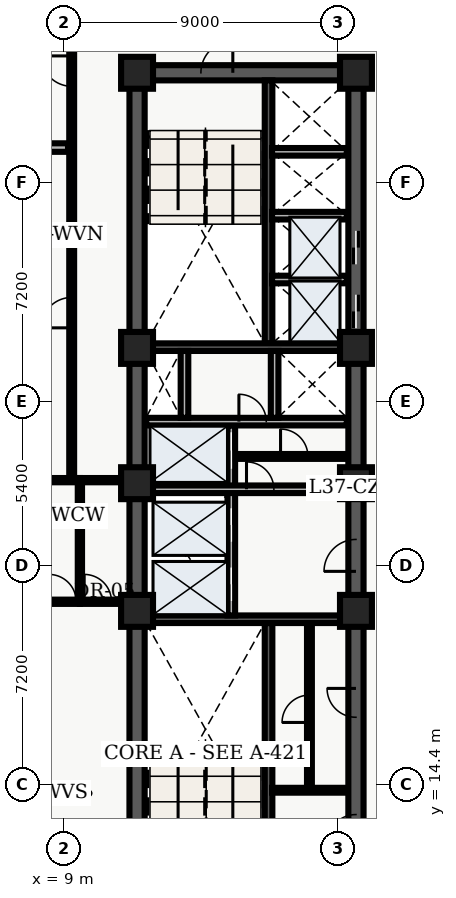
"""IFC4 building model, lengths in metres.
Left out: names, types, materials, properties, quantities, classifications, styles, units other than length and angle.
Written with IfcOpenShell. Run it as: python <this file> out.ifc"""

import sys

from ifc_helpers import new_model, entity, si_unit, converted_unit, direction, frame, origin_with_axes, origin_2d_with_axis, place, context, subcontext, project, spatial, polyline, rectangle, outline, extrude, element, fill, save


model = new_model("IFC4")
c1 = context("Model", 3, precision=1e-05, world=origin_with_axes(), true_north=direction((0.0, 1.0)))
c2 = subcontext(c1, "Body", "Model", "MODEL_VIEW")
j1 = project(units=[si_unit("LENGTHUNIT", "METRE"), converted_unit("PLANEANGLEUNIT", "DEGREE", entity("IfcPlaneAngleMeasure", 0.017), si_unit("PLANEANGLEUNIT", "RADIAN"), dimensions=[0, 0, 0, 0, 0, 0, 0])], contexts=[c1])
p1 = place(None, origin_with_axes())
s1 = spatial("IfcSite", under=j1, at=p1, CompositionType="ELEMENT")
p2 = place(p1, origin_with_axes())
s2 = spatial("IfcBuilding", under=s1, at=p2, CompositionType="ELEMENT")
p3 = place(p2, frame((0.0, 0.0, 152.4), z_axis=(0.0, 0.0, 1.0), x_axis=(1.0, 0.0, 0.0)))
s3 = spatial("IfcBuildingStorey", under=s2, at=p3, CompositionType="ELEMENT", Elevation=152.4)
p4 = place(p3, frame((11.4, 10.8, 0.0), z_axis=(0.0, 0.0, 1.0), x_axis=(0.0, 1.0, 0.0)))
e1 = element("IfcWall", 1, at=p4, inside=s3, PredefinedType="SHEAR", context=c2, shape_type="SweptSolid", body=[
    extrude(outline(polyline([(0.0, -0.25), (27.0, -0.25), (27.0, 0.25), (0.0, 0.25), (0.0, -0.25)])), origin_with_axes(), (0.0, 0.0, 1.0), 3.66),
])
p5 = place(p3, frame((11.4, 37.8, 0.0), z_axis=(0.0, 0.0, 1.0), x_axis=(1.0, 0.0, 0.0)))
e2 = element("IfcWall", 2, at=p5, inside=s3, PredefinedType="SHEAR", context=c2, shape_type="SweptSolid", body=[
    extrude(outline(polyline([(0.0, -0.25), (7.2, -0.25), (7.2, 0.25), (0.0, 0.25), (0.0, -0.25)])), origin_with_axes(), (0.0, 0.0, 1.0), 3.66),
])
p6 = place(p5, frame((2.625, 0.0, 0.0), z_axis=(0.0, 0.0, 1.0), x_axis=(1.0, 0.0, 0.0)))
e3 = element("IfcOpeningElement", 3, at=p6, cuts=e2, PredefinedType="OPENING", context=c2, shape_type="SweptSolid", body=[
    extrude(rectangle(XDim=1.05, YDim=0.52, at=origin_2d_with_axis()), origin_with_axes(), (0.0, 0.0, 1.0), 2.15),
])
p7 = place(p3, frame((18.6, 10.8, 0.0), z_axis=(0.0, 0.0, 1.0), x_axis=(0.0, 1.0, 0.0)))
e4 = element("IfcWall", 4, at=p7, inside=s3, PredefinedType="SHEAR", context=c2, shape_type="SweptSolid", body=[
    extrude(outline(polyline([(0.0, -0.25), (13.5, -0.25), (13.5, 0.25), (0.0, 0.25), (0.0, -0.25)])), origin_with_axes(), (0.0, 0.0, 1.0), 3.66),
])
p8 = place(p7, frame((11.125, 0.0, 0.0), z_axis=(0.0, 0.0, 1.0), x_axis=(1.0, 0.0, 0.0)))
e5 = element("IfcOpeningElement", 5, at=p8, cuts=e4, PredefinedType="OPENING", context=c2, shape_type="SweptSolid", body=[
    extrude(rectangle(XDim=1.05, YDim=0.52, at=origin_2d_with_axis()), origin_with_axes(), (0.0, 0.0, 1.0), 2.15),
])
p9 = place(p7, frame((2.125, 0.0, 0.0), z_axis=(0.0, 0.0, 1.0), x_axis=(1.0, 0.0, 0.0)))
e6 = element("IfcOpeningElement", 6, at=p9, cuts=e4, PredefinedType="OPENING", context=c2, shape_type="SweptSolid", body=[
    extrude(rectangle(XDim=0.95, YDim=0.52, at=origin_2d_with_axis()), origin_with_axes(), (0.0, 0.0, 1.0), 2.15),
])
p10 = place(p7, frame((6.275, 0.0, 0.0), z_axis=(0.0, 0.0, 1.0), x_axis=(1.0, 0.0, 0.0)))
e7 = element("IfcOpeningElement", 7, at=p10, cuts=e4, PredefinedType="OPENING", context=c2, shape_type="SweptSolid", body=[
    extrude(rectangle(XDim=0.95, YDim=0.52, at=origin_2d_with_axis()), origin_with_axes(), (0.0, 0.0, 1.0), 2.15),
])
p11 = place(p3, frame((18.6, 24.3, 0.0), z_axis=(0.0, 0.0, 1.0), x_axis=(0.0, 1.0, 0.0)))
e8 = element("IfcWall", 8, at=p11, inside=s3, PredefinedType="SHEAR", context=c2, shape_type="SweptSolid", body=[
    extrude(outline(polyline([(0.0, -0.25), (13.5, -0.25), (13.5, 0.25), (0.0, 0.25), (0.0, -0.25)])), origin_with_axes(), (0.0, 0.0, 1.0), 3.66),
])
p12 = place(p11, frame((5.65, 0.0, 0.0), z_axis=(0.0, 0.0, 1.0), x_axis=(1.0, 0.0, 0.0)))
e9 = element("IfcOpeningElement", 9, at=p12, cuts=e8, PredefinedType="OPENING", context=c2, shape_type="SweptSolid", body=[
    extrude(rectangle(XDim=1.1, YDim=0.52, at=origin_2d_with_axis()), origin_with_axes(), (0.0, 0.0, 1.0), 2.15),
])
p13 = place(p11, frame((7.75, 0.0, 0.0), z_axis=(0.0, 0.0, 1.0), x_axis=(1.0, 0.0, 0.0)))
e10 = element("IfcOpeningElement", 10, at=p13, cuts=e8, PredefinedType="OPENING", context=c2, shape_type="SweptSolid", body=[
    extrude(rectangle(XDim=1.1, YDim=0.52, at=origin_2d_with_axis()), origin_with_axes(), (0.0, 0.0, 1.0), 2.15),
])
p14 = place(p3, frame((15.725, 11.05, 0.0), z_axis=(0.0, 0.0, 1.0), x_axis=(0.0, 1.0, 0.0)))
e11 = element("IfcWall", 11, at=p14, inside=s3, PredefinedType="SHEAR", context=c2, shape_type="SweptSolid", body=[
    extrude(outline(polyline([(0.0, -0.125), (8.65, -0.125), (8.65, 0.125), (0.0, 0.125), (0.0, -0.125)])), origin_with_axes(), (0.0, 0.0, 1.0), 3.66),
])
p15 = place(p3, frame((11.65, 19.825, 0.0), z_axis=(0.0, 0.0, 1.0), x_axis=(1.0, 0.0, 0.0)))
e12 = element("IfcWall", 12, at=p15, inside=s3, PredefinedType="SHEAR", context=c2, shape_type="SweptSolid", body=[
    extrude(outline(polyline([(0.0, -0.125), (6.7, -0.125), (6.7, 0.125), (0.0, 0.125), (0.0, -0.125)])), origin_with_axes(), (0.0, 0.0, 1.0), 3.66),
])
p16 = place(p3, frame((15.725, 28.9, 0.0), z_axis=(0.0, 0.0, 1.0), x_axis=(0.0, 1.0, 0.0)))
e13 = element("IfcWall", 13, at=p16, inside=s3, PredefinedType="SHEAR", context=c2, shape_type="SweptSolid", body=[
    extrude(outline(polyline([(0.0, -0.125), (8.65, -0.125), (8.65, 0.125), (0.0, 0.125), (0.0, -0.125)])), origin_with_axes(), (0.0, 0.0, 1.0), 3.66),
])
p17 = place(p3, frame((11.65, 28.775, 0.0), z_axis=(0.0, 0.0, 1.0), x_axis=(1.0, 0.0, 0.0)))
e14 = element("IfcWall", 14, at=p17, inside=s3, PredefinedType="SHEAR", context=c2, shape_type="SweptSolid", body=[
    extrude(outline(polyline([(0.0, -0.125), (6.7, -0.125), (6.7, 0.125), (0.0, 0.125), (0.0, -0.125)])), origin_with_axes(), (0.0, 0.0, 1.0), 3.66),
])
p18 = place(p3, frame((14.5, 19.95, 0.0), z_axis=(0.0, 0.0, 1.0), x_axis=(0.0, 1.0, 0.0)))
e15 = element("IfcWall", 15, at=p18, inside=s3, PredefinedType="SOLIDWALL", context=c2, shape_type="SweptSolid", body=[
    extrude(outline(polyline([(0.0, -0.125), (6.25, -0.125), (6.25, 0.125), (0.0, 0.125), (0.0, -0.125)])), origin_with_axes(), (0.0, 0.0, 1.0), 2.7),
])
p19 = place(p18, frame((1.025, 0.0, 0.0), z_axis=(0.0, 0.0, 1.0), x_axis=(1.0, 0.0, 0.0)))
e16 = element("IfcOpeningElement", 16, at=p19, cuts=e15, PredefinedType="OPENING", context=c2, shape_type="SweptSolid", body=[
    extrude(rectangle(XDim=1.1, YDim=0.27, at=origin_2d_with_axis()), origin_with_axes(), (0.0, 0.0, 1.0), 2.15),
])
p20 = place(p18, frame((2.975, 0.0, 0.0), z_axis=(0.0, 0.0, 1.0), x_axis=(1.0, 0.0, 0.0)))
e17 = element("IfcOpeningElement", 17, at=p20, cuts=e15, PredefinedType="OPENING", context=c2, shape_type="SweptSolid", body=[
    extrude(rectangle(XDim=1.1, YDim=0.27, at=origin_2d_with_axis()), origin_with_axes(), (0.0, 0.0, 1.0), 2.15),
])
p21 = place(p18, frame((5.425, 0.0, 0.0), z_axis=(0.0, 0.0, 1.0), x_axis=(1.0, 0.0, 0.0)))
e18 = element("IfcOpeningElement", 18, at=p21, cuts=e15, PredefinedType="OPENING", context=c2, shape_type="SweptSolid", body=[
    extrude(rectangle(XDim=1.2, YDim=0.27, at=origin_2d_with_axis()), origin_with_axes(), (0.0, 0.0, 1.0), 2.15),
])
p22 = place(p3, frame((11.7, 24.1, 0.0), z_axis=(0.0, 0.0, 1.0), x_axis=(1.0, 0.0, 0.0)))
e19 = element("IfcWall", 19, at=p22, inside=s3, PredefinedType="SOLIDWALL", context=c2, shape_type="SweptSolid", body=[
    extrude(outline(polyline([(0.0, -0.125), (6.6, -0.125), (6.6, 0.125), (0.0, 0.125), (0.0, -0.125)])), origin_with_axes(), (0.0, 0.0, 1.0), 2.7),
])
p23 = place(p22, frame((3.75, 0.0, 0.0), z_axis=(0.0, 0.0, 1.0), x_axis=(1.0, 0.0, 0.0)))
e20 = element("IfcOpeningElement", 20, at=p23, cuts=e19, PredefinedType="OPENING", context=c2, shape_type="SweptSolid", body=[
    extrude(rectangle(XDim=0.9, YDim=0.27, at=origin_2d_with_axis()), origin_with_axes(), (0.0, 0.0, 1.0), 2.15),
])
p24 = place(p3, frame((11.7, 26.325, 0.0), z_axis=(0.0, 0.0, 1.0), x_axis=(1.0, 0.0, 0.0)))
e21 = element("IfcWall", 21, at=p24, inside=s3, PredefinedType="SOLIDWALL", context=c2, shape_type="SweptSolid", body=[
    extrude(outline(polyline([(0.0, -0.125), (6.6, -0.125), (6.6, 0.125), (0.0, 0.125), (0.0, -0.125)])), origin_with_axes(), (0.0, 0.0, 1.0), 2.7),
])
p25 = place(p24, frame((3.5, 0.0, 0.0), z_axis=(0.0, 0.0, 1.0), x_axis=(1.0, 0.0, 0.0)))
e22 = element("IfcOpeningElement", 22, at=p25, cuts=e21, PredefinedType="OPENING", context=c2, shape_type="SweptSolid", body=[
    extrude(rectangle(XDim=0.9, YDim=0.27, at=origin_2d_with_axis()), origin_with_axes(), (0.0, 0.0, 1.0), 2.15),
])
for number, where, z_axis, x_axis in (
    (23, (12.96, 26.45, 0.0), (0.0, 0.0, 1.0), (0.0, 1.0, 0.0)),
    (24, (15.925, 26.45, 0.0), (0.0, 0.0, 1.0), (0.0, 1.0, 0.0)),
):
    element("IfcWall", number, at=place(p3, frame(where, z_axis=z_axis, x_axis=x_axis)), inside=s3, PredefinedType="SOLIDWALL", context=c2, shape_type="SweptSolid", body=[
        extrude(outline(polyline([(0.0, -0.125), (2.2, -0.125), (2.2, 0.125), (0.0, 0.125), (0.0, -0.125)])), origin_with_axes(), (0.0, 0.0, 1.0), 2.7),
    ])
for number, where, z_axis, x_axis in (
    (25, (11.4, 20.1, 0.0), (0.0, 0.0, 1.0), (1.0, 0.0, 0.0)),
    (26, (11.4, 24.3, 0.0), (0.0, 0.0, 1.0), (1.0, 0.0, 0.0)),
    (27, (11.4, 28.75, 0.0), (0.0, 0.0, 1.0), (1.0, 0.0, 0.0)),
    (28, (11.4, 37.8, 0.0), (0.0, 0.0, 1.0), (1.0, 0.0, 0.0)),
    (29, (18.6, 20.1, 0.0), (0.0, 0.0, 1.0), (1.0, 0.0, 0.0)),
    (30, (18.6, 24.3, 0.0), (0.0, 0.0, 1.0), (1.0, 0.0, 0.0)),
    (31, (18.6, 28.75, 0.0), (0.0, 0.0, 1.0), (1.0, 0.0, 0.0)),
    (32, (18.6, 37.8, 0.0), (0.0, 0.0, 1.0), (1.0, 0.0, 0.0)),
):
    element("IfcColumn", number, at=place(p3, frame(where, z_axis=z_axis, x_axis=x_axis)), inside=s3, PredefinedType="COLUMN", context=c2, shape_type="SweptSolid", body=[
        extrude(rectangle(XDim=1.05, YDim=1.05, at=origin_2d_with_axis()), origin_with_axes(), (0.0, 0.0, 1.0), 3.9),
    ])
p26 = place(p3, frame((14.62, 25.18, 0.0), z_axis=(0.0, 0.0, 1.0), x_axis=(1.0, 0.0, 0.0)))
e33 = element("IfcWall", 33, at=p26, inside=s3, PredefinedType="PARTITIONING", context=c2, shape_type="SweptSolid", body=[
    extrude(outline(polyline([(0.0, -0.08), (3.68, -0.08), (3.68, 0.08), (0.0, 0.08), (0.0, -0.08)])), origin_with_axes(), (0.0, 0.0, 1.0), 2.7),
])
p27 = place(p26, frame((1.95, 0.0, 0.0), z_axis=(0.0, 0.0, 1.0), x_axis=(1.0, 0.0, 0.0)))
e34 = element("IfcOpeningElement", 34, at=p27, cuts=e33, PredefinedType="OPENING", context=c2, shape_type="SweptSolid", body=[
    extrude(rectangle(XDim=0.9, YDim=0.18, at=origin_2d_with_axis()), origin_with_axes(), (0.0, 0.0, 1.0), 2.15),
])
p28 = place(p3, frame((15.84, 14.2, 0.0), z_axis=(0.0, 0.0, 1.0), x_axis=(1.0, 0.0, 0.0)))
e35 = element("IfcWall", 35, at=p28, inside=s3, PredefinedType="PARTITIONING", context=c2, shape_type="SweptSolid", body=[
    extrude(outline(polyline([(0.0, -0.08), (2.46, -0.08), (2.46, 0.08), (0.0, 0.08), (0.0, -0.08)])), origin_with_axes(), (0.0, 0.0, 1.0), 2.7),
])
p29 = place(p3, frame((17.07, 14.28, 0.0), z_axis=(0.0, 0.0, 1.0), x_axis=(0.0, 1.0, 0.0)))
e36 = element("IfcWall", 36, at=p29, inside=s3, PredefinedType="PARTITIONING", context=c2, shape_type="SweptSolid", body=[
    extrude(outline(polyline([(0.0, -0.08), (5.42, -0.08), (5.42, 0.08), (0.0, 0.08), (0.0, -0.08)])), origin_with_axes(), (0.0, 0.0, 1.0), 2.7),
])
p30 = place(p29, frame((2.6, 0.0, 0.0), z_axis=(0.0, 0.0, 1.0), x_axis=(1.0, 0.0, 0.0)))
e37 = element("IfcOpeningElement", 37, at=p30, cuts=e36, PredefinedType="OPENING", context=c2, shape_type="SweptSolid", body=[
    extrude(rectangle(XDim=0.9, YDim=0.18, at=origin_2d_with_axis()), origin_with_axes(), (0.0, 0.0, 1.0), 2.15),
])
for number, where, z_axis, x_axis in (
    (38, (15.84, 31.0, 0.0), (0.0, 0.0, 1.0), (1.0, 0.0, 0.0)),
    (39, (15.84, 33.1, 0.0), (0.0, 0.0, 1.0), (1.0, 0.0, 0.0)),
    (40, (15.84, 35.2, 0.0), (0.0, 0.0, 1.0), (1.0, 0.0, 0.0)),
):
    element("IfcWall", number, at=place(p3, frame(where, z_axis=z_axis, x_axis=x_axis)), inside=s3, PredefinedType="SOLIDWALL", context=c2, shape_type="SweptSolid", body=[
        extrude(outline(polyline([(0.0, -0.125), (2.46, -0.125), (2.46, 0.125), (0.0, 0.125), (0.0, -0.125)])), origin_with_axes(), (0.0, 0.0, 1.0), 2.7),
    ])
p31 = place(p3, frame((9.52, 20.4, 0.0), z_axis=(0.0, 0.0, 1.0), x_axis=(0.0, 1.0, 0.0)))
e41 = element("IfcWall", 41, at=p31, inside=s3, PredefinedType="PARTITIONING", context=c2, shape_type="SweptSolid", body=[
    extrude(outline(polyline([(0.0, -0.07), (4.0, -0.07), (4.0, 0.07), (0.0, 0.07), (0.0, -0.07)])), origin_with_axes(), (0.0, 0.0, 1.0), 2.7),
])
p32 = place(p3, frame((9.52, 20.4, 0.0), z_axis=(0.0, 0.0, 1.0), x_axis=(1.0, 0.0, 0.0)))
e42 = element("IfcWall", 42, at=p32, inside=s3, PredefinedType="PARTITIONING", context=c2, shape_type="SweptSolid", body=[
    extrude(outline(polyline([(0.0, -0.07), (1.58, -0.07), (1.58, 0.07), (0.0, 0.07), (0.0, -0.07)])), origin_with_axes(), (0.0, 0.0, 1.0), 2.7),
])
p33 = place(p32, frame((0.59, 0.0, 0.0), z_axis=(0.0, 0.0, 1.0), x_axis=(1.0, 0.0, 0.0)))
e43 = element("IfcOpeningElement", 43, at=p33, cuts=e42, PredefinedType="OPENING", context=c2, shape_type="SweptSolid", body=[
    extrude(rectangle(XDim=0.9, YDim=0.16, at=origin_2d_with_axis()), origin_with_axes(), (0.0, 0.0, 1.0), 2.15),
])
p34 = place(p3, frame((9.52, 24.4, 0.0), z_axis=(0.0, 0.0, 1.0), x_axis=(1.0, 0.0, 0.0)))
e44 = element("IfcWall", 44, at=p34, inside=s3, PredefinedType="PARTITIONING", context=c2, shape_type="SweptSolid", body=[
    extrude(outline(polyline([(0.0, -0.07), (1.58, -0.07), (1.58, 0.07), (0.0, 0.07), (0.0, -0.07)])), origin_with_axes(), (0.0, 0.0, 1.0), 2.7),
])
p35 = place(p3, frame((9.25, 24.4, 0.0), z_axis=(0.0, 0.0, 1.0), x_axis=(0.0, 1.0, 0.0)))
e45 = element("IfcWall", 45, at=p35, inside=s3, PredefinedType="PARTITIONING", context=c2, shape_type="SweptSolid", body=[
    extrude(outline(polyline([(0.0, -0.08), (16.1, -0.08), (16.1, 0.08), (0.0, 0.08), (0.0, -0.08)])), origin_with_axes(), (0.0, 0.0, 1.0), 2.7),
])
p36 = place(p35, frame((5.51, 0.0, 0.0), z_axis=(0.0, 0.0, 1.0), x_axis=(1.0, 0.0, 0.0)))
e46 = element("IfcOpeningElement", 46, at=p36, cuts=e45, PredefinedType="OPENING", context=c2, shape_type="SweptSolid", body=[
    extrude(rectangle(XDim=1.0, YDim=0.18, at=origin_2d_with_axis()), origin_with_axes(), (0.0, 0.0, 1.0), 2.15),
])
p37 = place(p35, frame((13.455, 0.0, 0.0), z_axis=(0.0, 0.0, 1.0), x_axis=(1.0, 0.0, 0.0)))
e47 = element("IfcOpeningElement", 47, at=p37, cuts=e45, PredefinedType="OPENING", context=c2, shape_type="SweptSolid", body=[
    extrude(rectangle(XDim=1.0, YDim=0.18, at=origin_2d_with_axis()), origin_with_axes(), (0.0, 0.0, 1.0), 2.15),
])
p38 = place(p3, frame((0.335, 20.4, 0.0), z_axis=(0.0, 0.0, 1.0), x_axis=(1.0, 0.0, 0.0)))
e48 = element("IfcWall", 48, at=p38, inside=s3, PredefinedType="PARTITIONING", context=c2, shape_type="SweptSolid", body=[
    extrude(outline(polyline([(0.0, -0.07), (9.185, -0.07), (9.185, 0.07), (0.0, 0.07), (0.0, -0.07)])), origin_with_axes(), (0.0, 0.0, 1.0), 2.7),
])
p39 = place(p38, frame((8.615, 0.0, 0.0), z_axis=(0.0, 0.0, 1.0), x_axis=(1.0, 0.0, 0.0)))
e49 = element("IfcOpeningElement", 49, at=p39, cuts=e48, PredefinedType="OPENING", context=c2, shape_type="SweptSolid", body=[
    extrude(rectangle(XDim=0.9, YDim=0.16, at=origin_2d_with_axis()), origin_with_axes(), (0.0, 0.0, 1.0), 2.15),
])
p40 = place(p3, frame((0.335, 24.4, 0.0), z_axis=(0.0, 0.0, 1.0), x_axis=(1.0, 0.0, 0.0)))
e50 = element("IfcWall", 50, at=p40, inside=s3, PredefinedType="PARTITIONING", context=c2, shape_type="SweptSolid", body=[
    extrude(outline(polyline([(0.0, -0.07), (9.185, -0.07), (9.185, 0.07), (0.0, 0.07), (0.0, -0.07)])), origin_with_axes(), (0.0, 0.0, 1.0), 2.7),
])
p41 = place(p3, frame((0.335, 35.34, 0.0), z_axis=(0.0, 0.0, 1.0), x_axis=(1.0, 0.0, 0.0)))
e51 = element("IfcWall", 51, at=p41, inside=s3, PredefinedType="PARTITIONING", context=c2, shape_type="SweptSolid", body=[
    extrude(outline(polyline([(0.0, -0.14), (8.795, -0.14), (8.795, 0.14), (0.0, 0.14), (0.0, -0.14)])), origin_with_axes(), (0.0, 0.0, 1.0), 2.7),
])
p42 = place(p11, frame((5.65, 0.0, 0.0), z_axis=(0.0, 0.0, 1.0), x_axis=(1.0, 0.0, 0.0)))
e52 = element("IfcDoor", 52, at=p42, inside=s3, OperationType="SLIDING_TO_LEFT", PredefinedType="DOOR", context=c2, shape_type="SweptSolid", body=[
    extrude(rectangle(XDim=1.1, YDim=0.09, at=origin_2d_with_axis()), origin_with_axes(), (0.0, 0.0, 1.0), 2.15),
])
fill(e9, e52)
p43 = place(p11, frame((7.75, 0.0, 0.0), z_axis=(0.0, 0.0, 1.0), x_axis=(1.0, 0.0, 0.0)))
e53 = element("IfcDoor", 53, at=p43, inside=s3, OperationType="SLIDING_TO_RIGHT", PredefinedType="DOOR", context=c2, shape_type="SweptSolid", body=[
    extrude(rectangle(XDim=1.1, YDim=0.09, at=origin_2d_with_axis()), origin_with_axes(), (0.0, 0.0, 1.0), 2.15),
])
fill(e10, e53)
p44 = place(p18, frame((1.025, 0.0, 0.0), z_axis=(0.0, 0.0, 1.0), x_axis=(1.0, 0.0, 0.0)))
e54 = element("IfcDoor", 54, at=p44, inside=s3, OperationType="SLIDING_TO_LEFT", PredefinedType="DOOR", context=c2, shape_type="SweptSolid", body=[
    extrude(rectangle(XDim=1.1, YDim=0.09, at=origin_2d_with_axis()), origin_with_axes(), (0.0, 0.0, 1.0), 2.15),
])
fill(e16, e54)
p45 = place(p18, frame((2.975, 0.0, 0.0), z_axis=(0.0, 0.0, 1.0), x_axis=(1.0, 0.0, 0.0)))
e55 = element("IfcDoor", 55, at=p45, inside=s3, OperationType="SLIDING_TO_RIGHT", PredefinedType="DOOR", context=c2, shape_type="SweptSolid", body=[
    extrude(rectangle(XDim=1.1, YDim=0.09, at=origin_2d_with_axis()), origin_with_axes(), (0.0, 0.0, 1.0), 2.15),
])
fill(e17, e55)
p46 = place(p18, frame((5.425, 0.0, 0.0), z_axis=(0.0, 0.0, 1.0), x_axis=(1.0, 0.0, 0.0)))
e56 = element("IfcDoor", 56, at=p46, inside=s3, OperationType="DOUBLE_DOOR_SLIDING", PredefinedType="DOOR", context=c2, shape_type="SweptSolid", body=[
    extrude(rectangle(XDim=1.2, YDim=0.09, at=origin_2d_with_axis()), origin_with_axes(), (0.0, 0.0, 1.0), 2.15),
])
fill(e18, e56)
p47 = place(p5, frame((2.625, 0.0, 0.0), z_axis=(0.0, 0.0, 1.0), x_axis=(1.0, 0.0, 0.0)))
e57 = element("IfcDoor", 57, at=p47, inside=s3, OperationType="SINGLE_SWING_RIGHT", PredefinedType="DOOR", context=c2, shape_type="SweptSolid", body=[
    extrude(rectangle(XDim=1.05, YDim=0.09, at=origin_2d_with_axis()), origin_with_axes(), (0.0, 0.0, 1.0), 2.15),
])
fill(e3, e57)
p48 = place(p7, frame((11.125, 0.0, 0.0), z_axis=(0.0, 0.0, 1.0), x_axis=(1.0, 0.0, 0.0)))
e58 = element("IfcDoor", 58, at=p48, inside=s3, OperationType="SINGLE_SWING_LEFT", PredefinedType="DOOR", context=c2, shape_type="SweptSolid", body=[
    extrude(rectangle(XDim=1.05, YDim=0.09, at=origin_2d_with_axis()), origin_with_axes(), (0.0, 0.0, 1.0), 2.15),
])
fill(e5, e58)
p49 = place(p24, frame((3.5, 0.0, 0.0), z_axis=(0.0, 0.0, 1.0), x_axis=(1.0, 0.0, 0.0)))
e59 = element("IfcDoor", 59, at=p49, inside=s3, OperationType="SINGLE_SWING_LEFT", PredefinedType="DOOR", context=c2, shape_type="SweptSolid", body=[
    extrude(rectangle(XDim=0.9, YDim=0.09, at=origin_2d_with_axis()), origin_with_axes(), (0.0, 0.0, 1.0), 2.15),
])
fill(e22, e59)
p50 = place(p22, frame((3.75, 0.0, 0.0), z_axis=(0.0, 0.0, 1.0), x_axis=(1.0, 0.0, 0.0)))
e60 = element("IfcDoor", 60, at=p50, inside=s3, OperationType="SINGLE_SWING_LEFT", PredefinedType="DOOR", context=c2, shape_type="SweptSolid", body=[
    extrude(rectangle(XDim=0.9, YDim=0.09, at=origin_2d_with_axis()), origin_with_axes(), (0.0, 0.0, 1.0), 2.15),
])
fill(e20, e60)
p51 = place(p26, frame((1.95, 0.0, 0.0), z_axis=(0.0, 0.0, 1.0), x_axis=(1.0, 0.0, 0.0)))
e61 = element("IfcDoor", 61, at=p51, inside=s3, OperationType="SINGLE_SWING_LEFT", PredefinedType="DOOR", context=c2, shape_type="SweptSolid", body=[
    extrude(rectangle(XDim=0.9, YDim=0.09, at=origin_2d_with_axis()), origin_with_axes(), (0.0, 0.0, 1.0), 2.15),
])
fill(e34, e61)
p52 = place(p7, frame((2.125, 0.0, 0.0), z_axis=(0.0, 0.0, 1.0), x_axis=(1.0, 0.0, 0.0)))
e62 = element("IfcDoor", 62, at=p52, inside=s3, OperationType="SINGLE_SWING_LEFT", PredefinedType="DOOR", context=c2, shape_type="SweptSolid", body=[
    extrude(rectangle(XDim=0.95, YDim=0.09, at=origin_2d_with_axis()), origin_with_axes(), (0.0, 0.0, 1.0), 2.15),
])
fill(e6, e62)
p53 = place(p29, frame((2.6, 0.0, 0.0), z_axis=(0.0, 0.0, 1.0), x_axis=(1.0, 0.0, 0.0)))
e63 = element("IfcDoor", 63, at=p53, inside=s3, OperationType="SINGLE_SWING_LEFT", PredefinedType="DOOR", context=c2, shape_type="SweptSolid", body=[
    extrude(rectangle(XDim=0.9, YDim=0.09, at=origin_2d_with_axis()), origin_with_axes(), (0.0, 0.0, 1.0), 2.15),
])
fill(e37, e63)
p54 = place(p7, frame((6.275, 0.0, 0.0), z_axis=(0.0, 0.0, 1.0), x_axis=(1.0, 0.0, 0.0)))
e64 = element("IfcDoor", 64, at=p54, inside=s3, OperationType="SINGLE_SWING_RIGHT", PredefinedType="DOOR", context=c2, shape_type="SweptSolid", body=[
    extrude(rectangle(XDim=0.95, YDim=0.09, at=origin_2d_with_axis()), origin_with_axes(), (0.0, 0.0, 1.0), 2.15),
])
fill(e7, e64)
p55 = place(p32, frame((0.59, 0.0, 0.0), z_axis=(0.0, 0.0, 1.0), x_axis=(1.0, 0.0, 0.0)))
e65 = element("IfcDoor", 65, at=p55, inside=s3, OperationType="SINGLE_SWING_LEFT", PredefinedType="DOOR", context=c2, shape_type="SweptSolid", body=[
    extrude(rectangle(XDim=0.9, YDim=0.084, at=origin_2d_with_axis()), origin_with_axes(), (0.0, 0.0, 1.0), 2.15),
])
fill(e43, e65)
p56 = place(p38, frame((8.615, 0.0, 0.0), z_axis=(0.0, 0.0, 1.0), x_axis=(1.0, 0.0, 0.0)))
e66 = element("IfcDoor", 66, at=p56, inside=s3, OperationType="SINGLE_SWING_LEFT", PredefinedType="DOOR", context=c2, shape_type="SweptSolid", body=[
    extrude(rectangle(XDim=0.9, YDim=0.084, at=origin_2d_with_axis()), origin_with_axes(), (0.0, 0.0, 1.0), 2.15),
])
fill(e49, e66)
p57 = place(p35, frame((5.51, 0.0, 0.0), z_axis=(0.0, 0.0, 1.0), x_axis=(1.0, 0.0, 0.0)))
e67 = element("IfcDoor", 67, at=p57, inside=s3, OperationType="SINGLE_SWING_LEFT", PredefinedType="DOOR", context=c2, shape_type="SweptSolid", body=[
    extrude(rectangle(XDim=1.0, YDim=0.09, at=origin_2d_with_axis()), origin_with_axes(), (0.0, 0.0, 1.0), 2.15),
])
fill(e46, e67)
p58 = place(p35, frame((13.455, 0.0, 0.0), z_axis=(0.0, 0.0, 1.0), x_axis=(1.0, 0.0, 0.0)))
e68 = element("IfcDoor", 68, at=p58, inside=s3, OperationType="SINGLE_SWING_RIGHT", PredefinedType="DOOR", context=c2, shape_type="SweptSolid", body=[
    extrude(rectangle(XDim=1.0, YDim=0.09, at=origin_2d_with_axis()), origin_with_axes(), (0.0, 0.0, 1.0), 2.15),
])
fill(e47, e68)
save(model, sys.argv[1])
